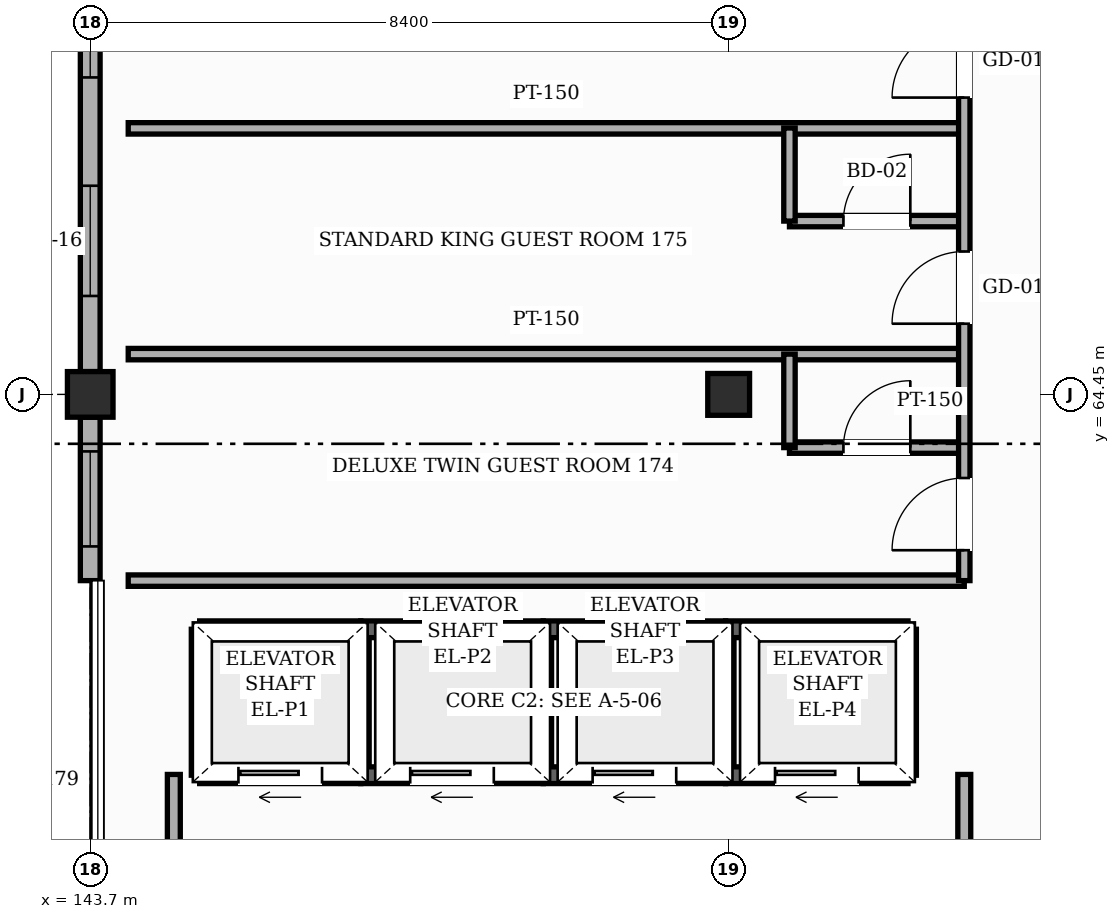
"""IFC4 building model, lengths in metres.
Left out: names, types, materials, properties, quantities, classifications, styles, units other than length and angle.
Written with IfcOpenShell. Run it as: python <this file> out.ifc"""

import sys

from ifc_helpers import new_model, si_unit, direction, frame, frame_2d, origin, origin_2d, place, context, subcontext, project, spatial, rectangle, hollow_rectangle, extrude, element, fill, save


model = new_model("IFC4")
c1 = context("Model", 3, precision=1e-05, world=origin(), true_north=direction((0.0, 1.0)))
c2 = subcontext(c1, "Body", "Model", "MODEL_VIEW")
j1 = project(units=[si_unit("LENGTHUNIT", "METRE"), si_unit("PLANEANGLEUNIT", "RADIAN")], contexts=[c1])
p1 = place(None, origin())
s1 = spatial("IfcSite", under=j1, at=p1, CompositionType="ELEMENT")
p2 = place(p1, origin())
s2 = spatial("IfcBuilding", under=s1, at=p2, CompositionType="ELEMENT")
p3 = place(p2, frame((0.0, 0.0, 31.8)))
s3 = spatial("IfcBuildingStorey", under=s2, at=p3, CompositionType="ELEMENT", Elevation=31.8)
p4 = place(p3, frame((143.7, 64.45, 0.0), z_axis=(0.0, 0.0, 1.0), x_axis=(1.0, 0.0, 0.0)))
e1 = element("IfcColumn", 1, at=p4, inside=s3, PredefinedType="COLUMN", context=c2, shape_type="SweptSolid", body=[
    extrude(hollow_rectangle(XDim=0.6, YDim=0.6, WallThickness=0.025, InnerFilletRadius=0.025, OuterFilletRadius=0.05, at=origin_2d()), origin(), (0.0, 0.0, 1.0), 3.6),
])
p5 = place(p3, frame((152.1, 64.45, 0.0), z_axis=(0.0, 0.0, 1.0), x_axis=(1.0, 0.0, 0.0)))
e2 = element("IfcColumn", 2, at=p5, inside=s3, PredefinedType="COLUMN", context=c2, shape_type="SweptSolid", body=[
    extrude(hollow_rectangle(XDim=0.55, YDim=0.55, WallThickness=0.022, InnerFilletRadius=0.022, OuterFilletRadius=0.044, at=origin_2d()), origin(), (0.0, 0.0, 1.0), 3.6),
])
p6 = place(p3, frame((143.7, 62.0, 0.0), z_axis=(0.0, 0.0, 1.0), x_axis=(0.0, 1.0, 0.0)))
e3 = element("IfcWall", 3, at=p6, inside=s3, PredefinedType="SOLIDWALL", context=c2, shape_type="SweptSolid", body=[
    extrude(rectangle(XDim=2.15, YDim=0.26, at=frame_2d((1.075, 0.0))), origin(), (0.0, 0.0, 1.0), 2.805),
])
p7 = place(p6, frame((0.45, 0.0, 0.85)))
e4 = element("IfcOpeningElement", 4, at=p7, cuts=e3, PredefinedType="OPENING", context=c2, shape_type="SweptSolid", body=[
    extrude(rectangle(XDim=1.25, YDim=1.35, at=frame_2d((0.625, 0.675))), frame((0.0, 0.14, 0.0), z_axis=(0.0, -1.0, 0.0), x_axis=(1.0, 0.0, 0.0)), (0.0, 0.0, 1.0), 0.28),
])
p8 = place(p3, frame((143.7, 64.75, 0.0), z_axis=(0.0, 0.0, 1.0), x_axis=(0.0, 1.0, 0.0)))
e5 = element("IfcWall", 5, at=p8, inside=s3, PredefinedType="SOLIDWALL", context=c2, shape_type="SweptSolid", body=[
    extrude(rectangle(XDim=8.3, YDim=0.26, at=frame_2d((4.15, 0.0))), origin(), (0.0, 0.0, 1.0), 2.655),
])
p9 = place(p8, frame((0.995, 0.0, 0.85)))
e6 = element("IfcOpeningElement", 6, at=p9, cuts=e5, PredefinedType="OPENING", context=c2, shape_type="SweptSolid", body=[
    extrude(rectangle(XDim=1.45, YDim=1.35, at=frame_2d((0.725, 0.675))), frame((0.0, 0.14, 0.0), z_axis=(0.0, -1.0, 0.0), x_axis=(1.0, 0.0, 0.0)), (0.0, 0.0, 1.0), 0.28),
])
p10 = place(p8, frame((3.87, 0.0, 0.85)))
e7 = element("IfcOpeningElement", 7, at=p10, cuts=e5, PredefinedType="OPENING", context=c2, shape_type="SweptSolid", body=[
    extrude(rectangle(XDim=1.65, YDim=1.35, at=frame_2d((0.825, 0.675))), frame((0.0, 0.14, 0.0), z_axis=(0.0, -1.0, 0.0), x_axis=(1.0, 0.0, 0.0)), (0.0, 0.0, 1.0), 0.28),
])
p11 = place(p8, frame((6.82, 0.0, 0.85)))
e8 = element("IfcOpeningElement", 8, at=p11, cuts=e5, PredefinedType="OPENING", context=c2, shape_type="SweptSolid", body=[
    extrude(rectangle(XDim=0.85, YDim=1.35, at=frame_2d((0.425, 0.675))), frame((0.0, 0.14, 0.0), z_axis=(0.0, -1.0, 0.0), x_axis=(1.0, 0.0, 0.0)), (0.0, 0.0, 1.0), 0.28),
])
p12 = place(p3, frame((145.14, 61.36, 0.0), z_axis=(0.0, 0.0, 1.0), x_axis=(1.0, 0.0, 0.0)))
e9 = element("IfcWall", 9, at=p12, inside=s3, PredefinedType="SHEAR", context=c2, shape_type="SweptSolid", body=[
    extrude(rectangle(XDim=2.12, YDim=0.22, at=frame_2d((1.06, 0.0))), origin(), (0.0, 0.0, 1.0), 3.38),
])
p13 = place(p3, frame((145.14, 59.44, 0.0), z_axis=(0.0, 0.0, 1.0), x_axis=(1.0, 0.0, 0.0)))
e10 = element("IfcWall", 10, at=p13, inside=s3, PredefinedType="SHEAR", context=c2, shape_type="SweptSolid", body=[
    extrude(rectangle(XDim=2.12, YDim=0.22, at=frame_2d((1.06, 0.0))), origin(), (0.0, 0.0, 1.0), 3.38),
])
p14 = place(p13, frame((0.51, 0.0, 0.0)))
e11 = element("IfcOpeningElement", 11, at=p14, cuts=e10, PredefinedType="OPENING", context=c2, shape_type="SweptSolid", body=[
    extrude(rectangle(XDim=1.1, YDim=2.2, at=frame_2d((0.55, 1.1))), frame((0.0, 0.12, 0.0), z_axis=(0.0, -1.0, 0.0), x_axis=(1.0, 0.0, 0.0)), (0.0, 0.0, 1.0), 0.24),
])
for number, where, z_axis, x_axis in (
    (12, (147.26, 59.44, 0.0), (0.0, 0.0, 1.0), (0.0, 1.0, 0.0)),
    (13, (145.14, 59.44, 0.0), (0.0, 0.0, 1.0), (0.0, 1.0, 0.0)),
):
    element("IfcWall", number, at=place(p3, frame(where, z_axis=z_axis, x_axis=x_axis)), inside=s3, PredefinedType="SHEAR", context=c2, shape_type="SweptSolid", body=[
        extrude(rectangle(XDim=1.92, YDim=0.22, at=frame_2d((0.96, 0.0))), origin(), (0.0, 0.0, 1.0), 3.38),
    ])
p15 = place(p3, frame((147.26, 61.36, 0.0), z_axis=(0.0, 0.0, 1.0), x_axis=(1.0, 0.0, 0.0)))
e14 = element("IfcWall", 14, at=p15, inside=s3, PredefinedType="SHEAR", context=c2, shape_type="SweptSolid", body=[
    extrude(rectangle(XDim=2.4, YDim=0.22, at=frame_2d((1.2, 0.0))), origin(), (0.0, 0.0, 1.0), 3.38),
])
p16 = place(p3, frame((147.26, 59.44, 0.0), z_axis=(0.0, 0.0, 1.0), x_axis=(1.0, 0.0, 0.0)))
e15 = element("IfcWall", 15, at=p16, inside=s3, PredefinedType="SHEAR", context=c2, shape_type="SweptSolid", body=[
    extrude(rectangle(XDim=2.4, YDim=0.22, at=frame_2d((1.2, 0.0))), origin(), (0.0, 0.0, 1.0), 3.38),
])
p17 = place(p16, frame((0.65, 0.0, 0.0)))
e16 = element("IfcOpeningElement", 16, at=p17, cuts=e15, PredefinedType="OPENING", context=c2, shape_type="SweptSolid", body=[
    extrude(rectangle(XDim=1.1, YDim=2.2, at=frame_2d((0.55, 1.1))), frame((0.0, 0.12, 0.0), z_axis=(0.0, -1.0, 0.0), x_axis=(1.0, 0.0, 0.0)), (0.0, 0.0, 1.0), 0.24),
])
p18 = place(p3, frame((149.66, 59.44, 0.0), z_axis=(0.0, 0.0, 1.0), x_axis=(0.0, 1.0, 0.0)))
e17 = element("IfcWall", 17, at=p18, inside=s3, PredefinedType="SHEAR", context=c2, shape_type="SweptSolid", body=[
    extrude(rectangle(XDim=1.92, YDim=0.22, at=frame_2d((0.96, 0.0))), origin(), (0.0, 0.0, 1.0), 3.38),
])
p19 = place(p3, frame((149.66, 61.36, 0.0), z_axis=(0.0, 0.0, 1.0), x_axis=(1.0, 0.0, 0.0)))
e18 = element("IfcWall", 18, at=p19, inside=s3, PredefinedType="SHEAR", context=c2, shape_type="SweptSolid", body=[
    extrude(rectangle(XDim=2.4, YDim=0.22, at=frame_2d((1.2, 0.0))), origin(), (0.0, 0.0, 1.0), 3.38),
])
p20 = place(p3, frame((149.66, 59.44, 0.0), z_axis=(0.0, 0.0, 1.0), x_axis=(1.0, 0.0, 0.0)))
e19 = element("IfcWall", 19, at=p20, inside=s3, PredefinedType="SHEAR", context=c2, shape_type="SweptSolid", body=[
    extrude(rectangle(XDim=2.4, YDim=0.22, at=frame_2d((1.2, 0.0))), origin(), (0.0, 0.0, 1.0), 3.38),
])
p21 = place(p20, frame((0.65, 0.0, 0.0)))
e20 = element("IfcOpeningElement", 20, at=p21, cuts=e19, PredefinedType="OPENING", context=c2, shape_type="SweptSolid", body=[
    extrude(rectangle(XDim=1.1, YDim=2.2, at=frame_2d((0.55, 1.1))), frame((0.0, 0.12, 0.0), z_axis=(0.0, -1.0, 0.0), x_axis=(1.0, 0.0, 0.0)), (0.0, 0.0, 1.0), 0.24),
])
p22 = place(p3, frame((152.06, 59.44, 0.0), z_axis=(0.0, 0.0, 1.0), x_axis=(0.0, 1.0, 0.0)))
e21 = element("IfcWall", 21, at=p22, inside=s3, PredefinedType="SHEAR", context=c2, shape_type="SweptSolid", body=[
    extrude(rectangle(XDim=1.92, YDim=0.22, at=frame_2d((0.96, 0.0))), origin(), (0.0, 0.0, 1.0), 3.38),
])
p23 = place(p3, frame((152.06, 61.36, 0.0), z_axis=(0.0, 0.0, 1.0), x_axis=(1.0, 0.0, 0.0)))
e22 = element("IfcWall", 22, at=p23, inside=s3, PredefinedType="SHEAR", context=c2, shape_type="SweptSolid", body=[
    extrude(rectangle(XDim=2.4, YDim=0.22, at=frame_2d((1.2, 0.0))), origin(), (0.0, 0.0, 1.0), 3.38),
])
p24 = place(p3, frame((152.06, 59.44, 0.0), z_axis=(0.0, 0.0, 1.0), x_axis=(1.0, 0.0, 0.0)))
e23 = element("IfcWall", 23, at=p24, inside=s3, PredefinedType="SHEAR", context=c2, shape_type="SweptSolid", body=[
    extrude(rectangle(XDim=2.4, YDim=0.22, at=frame_2d((1.2, 0.0))), origin(), (0.0, 0.0, 1.0), 3.38),
])
p25 = place(p24, frame((0.65, 0.0, 0.0)))
e24 = element("IfcOpeningElement", 24, at=p25, cuts=e23, PredefinedType="OPENING", context=c2, shape_type="SweptSolid", body=[
    extrude(rectangle(XDim=1.1, YDim=2.2, at=frame_2d((0.55, 1.1))), frame((0.0, 0.12, 0.0), z_axis=(0.0, -1.0, 0.0), x_axis=(1.0, 0.0, 0.0)), (0.0, 0.0, 1.0), 0.24),
])
p26 = place(p3, frame((154.46, 59.44, 0.0), z_axis=(0.0, 0.0, 1.0), x_axis=(0.0, 1.0, 0.0)))
e25 = element("IfcWall", 25, at=p26, inside=s3, PredefinedType="SHEAR", context=c2, shape_type="SweptSolid", body=[
    extrude(rectangle(XDim=1.92, YDim=0.22, at=frame_2d((0.96, 0.0))), origin(), (0.0, 0.0, 1.0), 3.38),
])
p27 = place(p3, frame((144.2, 62.0, 0.0), z_axis=(0.0, 0.0, 1.0), x_axis=(1.0, 0.0, 0.0)))
e26 = element("IfcWall", 26, at=p27, inside=s3, PredefinedType="PARTITIONING", context=c2, shape_type="SweptSolid", body=[
    extrude(rectangle(XDim=11.0, YDim=0.15, at=frame_2d((5.5, 0.0))), origin(), (0.0, 0.0, 1.0), 3.365),
])
p28 = place(p3, frame((152.9, 63.75, 0.0), z_axis=(0.0, 0.0, 1.0), x_axis=(1.0, 0.0, 0.0)))
e27 = element("IfcWall", 27, at=p28, inside=s3, PredefinedType="PARTITIONING", context=c2, shape_type="SweptSolid", body=[
    extrude(rectangle(XDim=2.3, YDim=0.15, at=frame_2d((1.15, 0.0))), origin(), (0.0, 0.0, 1.0), 3.365),
])
p29 = place(p28, frame((0.71, 0.0, 0.0)))
e28 = element("IfcOpeningElement", 28, at=p29, cuts=e27, PredefinedType="OPENING", context=c2, shape_type="SweptSolid", body=[
    extrude(rectangle(XDim=0.88, YDim=2.12, at=frame_2d((0.44, 1.06))), frame((0.0, 0.085, 0.0), z_axis=(0.0, -1.0, 0.0), x_axis=(1.0, 0.0, 0.0)), (0.0, 0.0, 1.0), 0.17),
])
p30 = place(p3, frame((144.2, 64.98, 0.0), z_axis=(0.0, 0.0, 1.0), x_axis=(1.0, 0.0, 0.0)))
e29 = element("IfcWall", 29, at=p30, inside=s3, PredefinedType="PARTITIONING", context=c2, shape_type="SweptSolid", body=[
    extrude(rectangle(XDim=11.0, YDim=0.15, at=frame_2d((5.5, 0.0))), origin(), (0.0, 0.0, 1.0), 3.365),
])
p31 = place(p3, frame((152.9, 66.73, 0.0), z_axis=(0.0, 0.0, 1.0), x_axis=(1.0, 0.0, 0.0)))
e30 = element("IfcWall", 30, at=p31, inside=s3, PredefinedType="PARTITIONING", context=c2, shape_type="SweptSolid", body=[
    extrude(rectangle(XDim=2.3, YDim=0.15, at=frame_2d((1.15, 0.0))), origin(), (0.0, 0.0, 1.0), 3.365),
])
p32 = place(p31, frame((0.71, 0.0, 0.0)))
e31 = element("IfcOpeningElement", 31, at=p32, cuts=e30, PredefinedType="OPENING", context=c2, shape_type="SweptSolid", body=[
    extrude(rectangle(XDim=0.88, YDim=2.12, at=frame_2d((0.44, 1.06))), frame((0.0, 0.085, 0.0), z_axis=(0.0, -1.0, 0.0), x_axis=(1.0, 0.0, 0.0)), (0.0, 0.0, 1.0), 0.17),
])
p33 = place(p3, frame((144.2, 67.95, 0.0), z_axis=(0.0, 0.0, 1.0), x_axis=(1.0, 0.0, 0.0)))
e32 = element("IfcWall", 32, at=p33, inside=s3, PredefinedType="PARTITIONING", context=c2, shape_type="SweptSolid", body=[
    extrude(rectangle(XDim=11.0, YDim=0.15, at=frame_2d((5.5, 0.0))), origin(), (0.0, 0.0, 1.0), 3.365),
])
p34 = place(p3, frame((144.8, 53.0, 0.0), z_axis=(0.0, 0.0, 1.0), x_axis=(0.0, 1.0, 0.0)))
e33 = element("IfcWall", 33, at=p34, inside=s3, PredefinedType="PARTITIONING", context=c2, shape_type="SweptSolid", body=[
    extrude(rectangle(XDim=6.45, YDim=0.17, at=frame_2d((3.225, 0.0))), origin(), (0.0, 0.0, 1.0), 3.365),
])
p35 = place(p3, frame((152.9, 63.75, 0.0), z_axis=(0.0, 0.0, 1.0), x_axis=(0.0, 1.0, 0.0)))
e34 = element("IfcWall", 34, at=p35, inside=s3, PredefinedType="PARTITIONING", context=c2, shape_type="SweptSolid", body=[
    extrude(rectangle(XDim=1.23, YDim=0.15, at=frame_2d((0.615, 0.0))), origin(), (0.0, 0.0, 1.0), 3.365),
])
p36 = place(p3, frame((152.9, 66.73, 0.0), z_axis=(0.0, 0.0, 1.0), x_axis=(0.0, 1.0, 0.0)))
e35 = element("IfcWall", 35, at=p36, inside=s3, PredefinedType="PARTITIONING", context=c2, shape_type="SweptSolid", body=[
    extrude(rectangle(XDim=1.225, YDim=0.15, at=frame_2d((0.613, 0.0))), origin(), (0.0, 0.0, 1.0), 3.365),
])
p37 = place(p3, frame((155.2, 53.0, 0.0), z_axis=(0.0, 0.0, 1.0), x_axis=(0.0, 1.0, 0.0)))
e36 = element("IfcWall", 36, at=p37, inside=s3, PredefinedType="PARTITIONING", context=c2, shape_type="SweptSolid", body=[
    extrude(rectangle(XDim=6.45, YDim=0.17, at=frame_2d((3.225, 0.0))), origin(), (0.0, 0.0, 1.0), 3.365),
])
p38 = place(p37, frame((2.625, 0.0, 0.0)))
e37 = element("IfcOpeningElement", 37, at=p38, cuts=e36, PredefinedType="OPENING", context=c2, shape_type="SweptSolid", body=[
    extrude(rectangle(XDim=1.2, YDim=2.2, at=frame_2d((0.6, 1.1))), frame((0.0, 0.095, 0.0), z_axis=(0.0, -1.0, 0.0), x_axis=(1.0, 0.0, 0.0)), (0.0, 0.0, 1.0), 0.19),
])
p39 = place(p3, frame((155.2, 62.0, 0.0), z_axis=(0.0, 0.0, 1.0), x_axis=(0.0, 1.0, 0.0)))
e38 = element("IfcWall", 38, at=p39, inside=s3, PredefinedType="PARTITIONING", context=c2, shape_type="SweptSolid", body=[
    extrude(rectangle(XDim=34.4, YDim=0.15, at=frame_2d((17.2, 0.0))), origin(), (0.0, 0.0, 1.0), 3.365),
])
p40 = place(p39, frame((29.775, 0.0, 0.0)))
e39 = element("IfcOpeningElement", 39, at=p40, cuts=e38, PredefinedType="OPENING", context=c2, shape_type="SweptSolid", body=[
    extrude(rectangle(XDim=1.65, YDim=2.35, at=frame_2d((0.825, 1.175))), frame((0.0, 0.085, 0.0), z_axis=(0.0, -1.0, 0.0), x_axis=(1.0, 0.0, 0.0)), (0.0, 0.0, 1.0), 0.17),
])
p41 = place(p39, frame((0.4, 0.0, 0.0)))
e40 = element("IfcOpeningElement", 40, at=p41, cuts=e38, PredefinedType="OPENING", context=c2, shape_type="SweptSolid", body=[
    extrude(rectangle(XDim=0.95, YDim=2.15, at=frame_2d((0.475, 1.075))), frame((0.0, 0.085, 0.0), z_axis=(0.0, -1.0, 0.0), x_axis=(1.0, 0.0, 0.0)), (0.0, 0.0, 1.0), 0.17),
])
p42 = place(p39, frame((3.38, 0.0, 0.0)))
e41 = element("IfcOpeningElement", 41, at=p42, cuts=e38, PredefinedType="OPENING", context=c2, shape_type="SweptSolid", body=[
    extrude(rectangle(XDim=0.95, YDim=2.15, at=frame_2d((0.475, 1.075))), frame((0.0, 0.085, 0.0), z_axis=(0.0, -1.0, 0.0), x_axis=(1.0, 0.0, 0.0)), (0.0, 0.0, 1.0), 0.17),
])
p43 = place(p39, frame((6.355, 0.0, 0.0)))
e42 = element("IfcOpeningElement", 42, at=p43, cuts=e38, PredefinedType="OPENING", context=c2, shape_type="SweptSolid", body=[
    extrude(rectangle(XDim=0.95, YDim=2.15, at=frame_2d((0.475, 1.075))), frame((0.0, 0.085, 0.0), z_axis=(0.0, -1.0, 0.0), x_axis=(1.0, 0.0, 0.0)), (0.0, 0.0, 1.0), 0.17),
])
p44 = place(p39, frame((9.335, 0.0, 0.0)))
e43 = element("IfcOpeningElement", 43, at=p44, cuts=e38, PredefinedType="OPENING", context=c2, shape_type="SweptSolid", body=[
    extrude(rectangle(XDim=0.95, YDim=2.15, at=frame_2d((0.475, 1.075))), frame((0.0, 0.085, 0.0), z_axis=(0.0, -1.0, 0.0), x_axis=(1.0, 0.0, 0.0)), (0.0, 0.0, 1.0), 0.17),
])
p45 = place(p39, frame((12.31, 0.0, 0.0)))
e44 = element("IfcOpeningElement", 44, at=p45, cuts=e38, PredefinedType="OPENING", context=c2, shape_type="SweptSolid", body=[
    extrude(rectangle(XDim=0.95, YDim=2.15, at=frame_2d((0.475, 1.075))), frame((0.0, 0.085, 0.0), z_axis=(0.0, -1.0, 0.0), x_axis=(1.0, 0.0, 0.0)), (0.0, 0.0, 1.0), 0.17),
])
p46 = place(p39, frame((15.29, 0.0, 0.0)))
e45 = element("IfcOpeningElement", 45, at=p46, cuts=e38, PredefinedType="OPENING", context=c2, shape_type="SweptSolid", body=[
    extrude(rectangle(XDim=0.95, YDim=2.15, at=frame_2d((0.475, 1.075))), frame((0.0, 0.085, 0.0), z_axis=(0.0, -1.0, 0.0), x_axis=(1.0, 0.0, 0.0)), (0.0, 0.0, 1.0), 0.17),
])
p47 = place(p39, frame((18.265, 0.0, 0.0)))
e46 = element("IfcOpeningElement", 46, at=p47, cuts=e38, PredefinedType="OPENING", context=c2, shape_type="SweptSolid", body=[
    extrude(rectangle(XDim=0.95, YDim=2.15, at=frame_2d((0.475, 1.075))), frame((0.0, 0.085, 0.0), z_axis=(0.0, -1.0, 0.0), x_axis=(1.0, 0.0, 0.0)), (0.0, 0.0, 1.0), 0.17),
])
p48 = place(p39, frame((21.245, 0.0, 0.0)))
e47 = element("IfcOpeningElement", 47, at=p48, cuts=e38, PredefinedType="OPENING", context=c2, shape_type="SweptSolid", body=[
    extrude(rectangle(XDim=0.95, YDim=2.15, at=frame_2d((0.475, 1.075))), frame((0.0, 0.085, 0.0), z_axis=(0.0, -1.0, 0.0), x_axis=(1.0, 0.0, 0.0)), (0.0, 0.0, 1.0), 0.17),
])
p49 = place(p39, frame((24.22, 0.0, 0.0)))
e48 = element("IfcOpeningElement", 48, at=p49, cuts=e38, PredefinedType="OPENING", context=c2, shape_type="SweptSolid", body=[
    extrude(rectangle(XDim=0.95, YDim=2.15, at=frame_2d((0.475, 1.075))), frame((0.0, 0.085, 0.0), z_axis=(0.0, -1.0, 0.0), x_axis=(1.0, 0.0, 0.0)), (0.0, 0.0, 1.0), 0.17),
])
p50 = place(p7, origin())
e49 = element("IfcWindow", 49, at=p50, inside=s3, PartitioningType="SINGLE_PANEL", PredefinedType="WINDOW", context=c2, shape_type="SweptSolid", body=[
    extrude(rectangle(XDim=1.25, YDim=1.35, at=frame_2d((0.625, 0.675))), frame((0.0, 0.03, 0.0), z_axis=(0.0, -1.0, 0.0), x_axis=(1.0, 0.0, 0.0)), (0.0, 0.0, 1.0), 0.06),
])
fill(e4, e49)
p51 = place(p9, origin())
e50 = element("IfcWindow", 50, at=p51, inside=s3, PartitioningType="SINGLE_PANEL", PredefinedType="WINDOW", context=c2, shape_type="SweptSolid", body=[
    extrude(rectangle(XDim=1.45, YDim=1.35, at=frame_2d((0.725, 0.675))), frame((0.0, 0.03, 0.0), z_axis=(0.0, -1.0, 0.0), x_axis=(1.0, 0.0, 0.0)), (0.0, 0.0, 1.0), 0.06),
])
fill(e6, e50)
p52 = place(p10, origin())
e51 = element("IfcWindow", 51, at=p52, inside=s3, PartitioningType="SINGLE_PANEL", PredefinedType="WINDOW", context=c2, shape_type="SweptSolid", body=[
    extrude(rectangle(XDim=1.65, YDim=1.35, at=frame_2d((0.825, 0.675))), frame((0.0, 0.03, 0.0), z_axis=(0.0, -1.0, 0.0), x_axis=(1.0, 0.0, 0.0)), (0.0, 0.0, 1.0), 0.06),
])
fill(e7, e51)
p53 = place(p14, origin())
e52 = element("IfcDoor", 52, at=p53, inside=s3, OperationType="SLIDING_TO_LEFT", PredefinedType="DOOR", context=c2, shape_type="SweptSolid", body=[
    extrude(rectangle(XDim=1.1, YDim=2.2, at=frame_2d((0.55, 1.1))), frame((0.0, 0.025, 0.0), z_axis=(0.0, -1.0, 0.0), x_axis=(1.0, 0.0, 0.0)), (0.0, 0.0, 1.0), 0.05),
])
fill(e11, e52)
p54 = place(p17, origin())
e53 = element("IfcDoor", 53, at=p54, inside=s3, OperationType="SLIDING_TO_LEFT", PredefinedType="DOOR", context=c2, shape_type="SweptSolid", body=[
    extrude(rectangle(XDim=1.1, YDim=2.2, at=frame_2d((0.55, 1.1))), frame((0.0, 0.025, 0.0), z_axis=(0.0, -1.0, 0.0), x_axis=(1.0, 0.0, 0.0)), (0.0, 0.0, 1.0), 0.05),
])
fill(e16, e53)
p55 = place(p21, origin())
e54 = element("IfcDoor", 54, at=p55, inside=s3, OperationType="SLIDING_TO_LEFT", PredefinedType="DOOR", context=c2, shape_type="SweptSolid", body=[
    extrude(rectangle(XDim=1.1, YDim=2.2, at=frame_2d((0.55, 1.1))), frame((0.0, 0.025, 0.0), z_axis=(0.0, -1.0, 0.0), x_axis=(1.0, 0.0, 0.0)), (0.0, 0.0, 1.0), 0.05),
])
fill(e20, e54)
p56 = place(p25, origin())
e55 = element("IfcDoor", 55, at=p56, inside=s3, OperationType="SLIDING_TO_LEFT", PredefinedType="DOOR", context=c2, shape_type="SweptSolid", body=[
    extrude(rectangle(XDim=1.1, YDim=2.2, at=frame_2d((0.55, 1.1))), frame((0.0, 0.025, 0.0), z_axis=(0.0, -1.0, 0.0), x_axis=(1.0, 0.0, 0.0)), (0.0, 0.0, 1.0), 0.05),
])
fill(e24, e55)
p57 = place(p41, origin())
e56 = element("IfcDoor", 56, at=p57, inside=s3, OperationType="SINGLE_SWING_LEFT", PredefinedType="DOOR", context=c2, shape_type="SweptSolid", body=[
    extrude(rectangle(XDim=0.95, YDim=2.15, at=frame_2d((0.475, 1.075))), frame((0.0, 0.025, 0.0), z_axis=(0.0, -1.0, 0.0), x_axis=(1.0, 0.0, 0.0)), (0.0, 0.0, 1.0), 0.05),
])
fill(e40, e56)
p58 = place(p29, origin())
e57 = element("IfcDoor", 57, at=p58, inside=s3, OperationType="SINGLE_SWING_RIGHT", PredefinedType="DOOR", context=c2, shape_type="SweptSolid", body=[
    extrude(rectangle(XDim=0.88, YDim=2.12, at=frame_2d((0.44, 1.06))), frame((0.0, 0.025, 0.0), z_axis=(0.0, -1.0, 0.0), x_axis=(1.0, 0.0, 0.0)), (0.0, 0.0, 1.0), 0.05),
])
fill(e28, e57)
p59 = place(p42, origin())
e58 = element("IfcDoor", 58, at=p59, inside=s3, OperationType="SINGLE_SWING_LEFT", PredefinedType="DOOR", context=c2, shape_type="SweptSolid", body=[
    extrude(rectangle(XDim=0.95, YDim=2.15, at=frame_2d((0.475, 1.075))), frame((0.0, 0.025, 0.0), z_axis=(0.0, -1.0, 0.0), x_axis=(1.0, 0.0, 0.0)), (0.0, 0.0, 1.0), 0.05),
])
fill(e41, e58)
p60 = place(p32, origin())
e59 = element("IfcDoor", 59, at=p60, inside=s3, OperationType="SINGLE_SWING_RIGHT", PredefinedType="DOOR", context=c2, shape_type="SweptSolid", body=[
    extrude(rectangle(XDim=0.88, YDim=2.12, at=frame_2d((0.44, 1.06))), frame((0.0, 0.025, 0.0), z_axis=(0.0, -1.0, 0.0), x_axis=(1.0, 0.0, 0.0)), (0.0, 0.0, 1.0), 0.05),
])
fill(e31, e59)
p61 = place(p43, origin())
e60 = element("IfcDoor", 60, at=p61, inside=s3, OperationType="SINGLE_SWING_LEFT", PredefinedType="DOOR", context=c2, shape_type="SweptSolid", body=[
    extrude(rectangle(XDim=0.95, YDim=2.15, at=frame_2d((0.475, 1.075))), frame((0.0, 0.025, 0.0), z_axis=(0.0, -1.0, 0.0), x_axis=(1.0, 0.0, 0.0)), (0.0, 0.0, 1.0), 0.05),
])
fill(e42, e60)
save(model, sys.argv[1])
